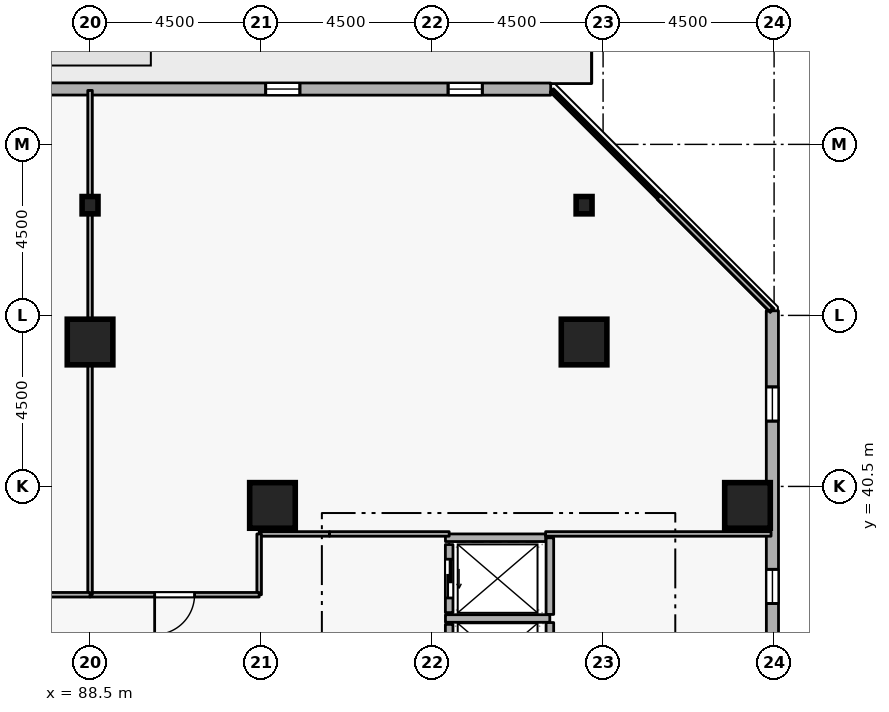
"""IFC4 building model, lengths in metres.
Left out: names, types, materials, properties, quantities, classifications, styles, units other than length and angle.
Written with IfcOpenShell. Run it as: python <this file> out.ifc"""

import sys

from ifc_helpers import new_model, si_unit, direction, frame, frame_2d, origin, origin_2d, place, context, subcontext, project, spatial, rectangle, i_section, extrude, element, fill, save


model = new_model("IFC4")
c1 = context("Model", 3, precision=1e-05, world=origin(), true_north=direction((0.0, 1.0)))
c2 = subcontext(c1, "Body", "Model", "MODEL_VIEW")
j1 = project(units=[si_unit("LENGTHUNIT", "METRE"), si_unit("PLANEANGLEUNIT", "RADIAN")], contexts=[c1])
p1 = place(None, origin())
s1 = spatial("IfcSite", under=j1, at=p1, CompositionType="ELEMENT")
p2 = place(p1, origin())
s2 = spatial("IfcBuilding", under=s1, at=p2, CompositionType="ELEMENT")
p3 = place(p2, frame((0.0, 0.0, 80.1)))
s3 = spatial("IfcBuildingStorey", under=s2, at=p3, CompositionType="ELEMENT", Elevation=80.1)
for number, where, z_axis, x_axis in (
    (1, (105.8, 40.0, 0.0), (0.0, 0.0, 1.0), (1.0, 0.0, 0.0)),
    (2, (101.5, 44.3, 0.0), (0.0, 0.0, 1.0), (1.0, 0.0, 0.0)),
    (3, (88.5, 44.3, 0.0), (0.0, 0.0, 1.0), (1.0, 0.0, 0.0)),
    (4, (93.3, 40.0, 0.0), (0.0, 0.0, 1.0), (1.0, 0.0, 0.0)),
):
    element("IfcColumn", number, at=place(p3, frame(where, z_axis=z_axis, x_axis=x_axis)), inside=s3, PredefinedType="COLUMN", context=c2, shape_type="SweptSolid", body=[
        extrude(rectangle(XDim=1.2, YDim=1.2, at=origin_2d()), origin(), (0.0, 0.0, 1.0), 3.6),
    ])
for number, where, z_axis, x_axis in (
    (5, (101.5, 47.9, 0.0), (0.0, 0.0, 1.0), (1.0, 0.0, 0.0)),
    (6, (88.5, 47.9, 0.0), (0.0, 0.0, 1.0), (1.0, 0.0, 0.0)),
):
    element("IfcColumn", number, at=place(p3, frame(where, z_axis=z_axis, x_axis=x_axis)), inside=s3, PredefinedType="COLUMN", context=c2, shape_type="SweptSolid", body=[
        extrude(i_section(OverallWidth=0.418, OverallDepth=0.456, WebThickness=0.042, FlangeThickness=0.067, FilletRadius=0.015, at=origin_2d()), origin(), (0.0, 0.0, 1.0), 3.6),
    ])
p4 = place(p3, frame((106.465, 11.619, 0.0), z_axis=(0.0, 0.0, 1.0), x_axis=(-0.000313347115, 0.999999950907, 0.0)))
e7 = element("IfcWall", 7, at=p4, inside=s3, PredefinedType="STANDARD", context=c2, shape_type="SweptSolid", body=[
    extrude(rectangle(XDim=33.503, YDim=0.32, at=frame_2d((16.751, 0.0))), origin(), (0.0, 0.0, 1.0), 2.7),
])
p5 = place(p4, frame((6.6, 0.0, 0.72)))
e8 = element("IfcOpeningElement", 8, at=p5, cuts=e7, PredefinedType="OPENING", context=c2, shape_type="SweptSolid", body=[
    extrude(rectangle(XDim=0.9, YDim=1.75, at=frame_2d((0.45, 0.875))), frame((0.0, 0.17, 0.0), z_axis=(0.0, -1.0, 0.0), x_axis=(1.0, 0.0, 0.0)), (0.0, 0.0, 1.0), 0.34),
])
p6 = place(p4, frame((11.4, 0.0, 0.72)))
e9 = element("IfcOpeningElement", 9, at=p6, cuts=e7, PredefinedType="OPENING", context=c2, shape_type="SweptSolid", body=[
    extrude(rectangle(XDim=0.9, YDim=1.75, at=frame_2d((0.45, 0.875))), frame((0.0, 0.17, 0.0), z_axis=(0.0, -1.0, 0.0), x_axis=(1.0, 0.0, 0.0)), (0.0, 0.0, 1.0), 0.34),
])
p7 = place(p4, frame((21.0, 0.0, 0.72)))
e10 = element("IfcOpeningElement", 10, at=p7, cuts=e7, PredefinedType="OPENING", context=c2, shape_type="SweptSolid", body=[
    extrude(rectangle(XDim=0.9, YDim=1.75, at=frame_2d((0.45, 0.875))), frame((0.0, 0.17, 0.0), z_axis=(0.0, -1.0, 0.0), x_axis=(1.0, 0.0, 0.0)), (0.0, 0.0, 1.0), 0.34),
])
p8 = place(p4, frame((25.8, 0.0, 0.72)))
e11 = element("IfcOpeningElement", 11, at=p8, cuts=e7, PredefinedType="OPENING", context=c2, shape_type="SweptSolid", body=[
    extrude(rectangle(XDim=0.9, YDim=1.75, at=frame_2d((0.45, 0.875))), frame((0.0, 0.17, 0.0), z_axis=(0.0, -1.0, 0.0), x_axis=(1.0, 0.0, 0.0)), (0.0, 0.0, 1.0), 0.34),
])
p9 = place(p4, frame((30.6, 0.0, 0.72)))
e12 = element("IfcOpeningElement", 12, at=p9, cuts=e7, PredefinedType="OPENING", context=c2, shape_type="SweptSolid", body=[
    extrude(rectangle(XDim=0.9, YDim=1.75, at=frame_2d((0.45, 0.875))), frame((0.0, 0.17, 0.0), z_axis=(0.0, -1.0, 0.0), x_axis=(1.0, 0.0, 0.0)), (0.0, 0.0, 1.0), 0.34),
])
p10 = place(p3, frame((100.622, 50.954, 0.0), z_axis=(0.0, 0.0, 1.0), x_axis=(-0.999999950907, 0.000313347115, 0.0)))
e13 = element("IfcWall", 13, at=p10, inside=s3, PredefinedType="STANDARD", context=c2, shape_type="SweptSolid", body=[
    extrude(rectangle(XDim=33.503, YDim=0.32, at=frame_2d((16.751, 0.0))), origin(), (0.0, 0.0, 1.0), 2.7),
])
p11 = place(p10, frame((18.552, 0.0, 0.0)))
e14 = element("IfcOpeningElement", 14, at=p11, cuts=e13, PredefinedType="OPENING", context=c2, shape_type="SweptSolid", body=[
    extrude(rectangle(XDim=1.0, YDim=2.08, at=frame_2d((0.5, 1.04))), frame((0.0, 0.17, 0.0), z_axis=(0.0, -1.0, 0.0), x_axis=(1.0, 0.0, 0.0)), (0.0, 0.0, 1.0), 0.34),
])
p12 = place(p10, frame((1.8, 0.0, 0.72)))
e15 = element("IfcOpeningElement", 15, at=p12, cuts=e13, PredefinedType="OPENING", context=c2, shape_type="SweptSolid", body=[
    extrude(rectangle(XDim=0.9, YDim=1.75, at=frame_2d((0.45, 0.875))), frame((0.0, 0.17, 0.0), z_axis=(0.0, -1.0, 0.0), x_axis=(1.0, 0.0, 0.0)), (0.0, 0.0, 1.0), 0.34),
])
p13 = place(p10, frame((6.6, 0.0, 0.72)))
e16 = element("IfcOpeningElement", 16, at=p13, cuts=e13, PredefinedType="OPENING", context=c2, shape_type="SweptSolid", body=[
    extrude(rectangle(XDim=0.9, YDim=1.75, at=frame_2d((0.45, 0.875))), frame((0.0, 0.17, 0.0), z_axis=(0.0, -1.0, 0.0), x_axis=(1.0, 0.0, 0.0)), (0.0, 0.0, 1.0), 0.34),
])
p14 = place(p10, frame((16.2, 0.0, 0.72)))
e17 = element("IfcOpeningElement", 17, at=p14, cuts=e13, PredefinedType="OPENING", context=c2, shape_type="SweptSolid", body=[
    extrude(rectangle(XDim=0.9, YDim=1.75, at=frame_2d((0.45, 0.875))), frame((0.0, 0.17, 0.0), z_axis=(0.0, -1.0, 0.0), x_axis=(1.0, 0.0, 0.0)), (0.0, 0.0, 1.0), 0.34),
])
p15 = place(p10, frame((21.0, 0.0, 0.72)))
e18 = element("IfcOpeningElement", 18, at=p15, cuts=e13, PredefinedType="OPENING", context=c2, shape_type="SweptSolid", body=[
    extrude(rectangle(XDim=0.9, YDim=1.75, at=frame_2d((0.45, 0.875))), frame((0.0, 0.17, 0.0), z_axis=(0.0, -1.0, 0.0), x_axis=(1.0, 0.0, 0.0)), (0.0, 0.0, 1.0), 0.34),
])
p16 = place(p10, frame((25.8, 0.0, 0.72)))
e19 = element("IfcOpeningElement", 19, at=p16, cuts=e13, PredefinedType="OPENING", context=c2, shape_type="SweptSolid", body=[
    extrude(rectangle(XDim=0.9, YDim=1.75, at=frame_2d((0.45, 0.875))), frame((0.0, 0.17, 0.0), z_axis=(0.0, -1.0, 0.0), x_axis=(1.0, 0.0, 0.0)), (0.0, 0.0, 1.0), 0.34),
])
p17 = place(p10, frame((30.6, 0.0, 0.72)))
e20 = element("IfcOpeningElement", 20, at=p17, cuts=e13, PredefinedType="OPENING", context=c2, shape_type="SweptSolid", body=[
    extrude(rectangle(XDim=0.9, YDim=1.75, at=frame_2d((0.45, 0.875))), frame((0.0, 0.17, 0.0), z_axis=(0.0, -1.0, 0.0), x_axis=(1.0, 0.0, 0.0)), (0.0, 0.0, 1.0), 0.34),
])
p18 = place(p3, frame((97.95, 36.87, 0.0), z_axis=(0.0, 0.0, 1.0), x_axis=(0.0, -1.0, 0.0)))
e21 = element("IfcWall", 21, at=p18, inside=s3, PredefinedType="STANDARD", context=c2, shape_type="SweptSolid", body=[
    extrude(rectangle(XDim=1.74, YDim=0.2, at=frame_2d((0.87, 0.0))), origin(), (0.0, 0.0, 1.0), 3.34),
])
p19 = place(p18, frame((0.36, 0.0, 0.0)))
e22 = element("IfcOpeningElement", 22, at=p19, cuts=e21, PredefinedType="OPENING", context=c2, shape_type="SweptSolid", body=[
    extrude(rectangle(XDim=1.02, YDim=2.06, at=frame_2d((0.51, 1.03))), frame((0.0, 0.11, 0.0), z_axis=(0.0, -1.0, 0.0), x_axis=(1.0, 0.0, 0.0)), (0.0, 0.0, 1.0), 0.22),
])
p20 = place(p3, frame((97.95, 38.97, 0.0), z_axis=(0.0, 0.0, 1.0), x_axis=(0.0, -1.0, 0.0)))
e23 = element("IfcWall", 23, at=p20, inside=s3, PredefinedType="STANDARD", context=c2, shape_type="SweptSolid", body=[
    extrude(rectangle(XDim=1.79, YDim=0.2, at=frame_2d((0.895, 0.0))), origin(), (0.0, 0.0, 1.0), 3.34),
])
p21 = place(p20, frame((0.385, 0.0, 0.0)))
e24 = element("IfcOpeningElement", 24, at=p21, cuts=e23, PredefinedType="OPENING", context=c2, shape_type="SweptSolid", body=[
    extrude(rectangle(XDim=1.02, YDim=2.06, at=frame_2d((0.51, 1.03))), frame((0.0, 0.11, 0.0), z_axis=(0.0, -1.0, 0.0), x_axis=(1.0, 0.0, 0.0)), (0.0, 0.0, 1.0), 0.22),
])
p22 = place(p3, frame((97.852, 37.025, 0.0), z_axis=(0.0, 0.0, 1.0), x_axis=(1.0, 0.0, 0.0)))
e25 = element("IfcWall", 25, at=p22, inside=s3, PredefinedType="STANDARD", context=c2, shape_type="SweptSolid", body=[
    extrude(rectangle(XDim=2.746, YDim=0.2, at=frame_2d((1.373, 0.0))), origin(), (0.0, 0.0, 1.0), 3.34),
])
p23 = place(p3, frame((100.6, 35.062, 0.0), z_axis=(0.0, 0.0, 1.0), x_axis=(0.0, 1.0, 0.0)))
e26 = element("IfcWall", 26, at=p23, inside=s3, PredefinedType="STANDARD", context=c2, shape_type="SweptSolid", body=[
    extrude(rectangle(XDim=1.856, YDim=0.2, at=frame_2d((0.928, 0.0))), origin(), (0.0, 0.0, 1.0), 3.34),
])
p24 = place(p3, frame((100.6, 37.132, 0.0), z_axis=(0.0, 0.0, 1.0), x_axis=(0.0, 1.0, 0.0)))
e27 = element("IfcWall", 27, at=p24, inside=s3, PredefinedType="STANDARD", context=c2, shape_type="SweptSolid", body=[
    extrude(rectangle(XDim=2.016, YDim=0.2, at=frame_2d((1.008, 0.0))), origin(), (0.0, 0.0, 1.0), 3.34),
])
p25 = place(p3, frame((97.852, 39.15, 0.0), z_axis=(0.0, 0.0, 1.0), x_axis=(1.0, 0.0, 0.0)))
e28 = element("IfcWall", 28, at=p25, inside=s3, PredefinedType="STANDARD", context=c2, shape_type="SweptSolid", body=[
    extrude(rectangle(XDim=2.636, YDim=0.2, at=frame_2d((1.318, 0.0))), origin(), (0.0, 0.0, 1.0), 3.34),
])
p26 = place(p3, frame((106.42, 39.25, 0.0), z_axis=(0.0, 0.0, 1.0), x_axis=(-1.0, 0.0, 0.0)))
e29 = element("IfcWall", 29, at=p26, inside=s3, PredefinedType="PARTITIONING", context=c2, shape_type="SweptSolid", body=[
    extrude(rectangle(XDim=5.932, YDim=0.12, at=frame_2d((2.966, 0.0))), origin(), (0.0, 0.0, 1.0), 3.34),
])
p27 = place(p3, frame((97.95, 39.25, 0.0), z_axis=(0.0, 0.0, 1.0), x_axis=(-1.0, 0.0, 0.0)))
e30 = element("IfcWall", 30, at=p27, inside=s3, PredefinedType="PARTITIONING", context=c2, shape_type="SweptSolid", body=[
    extrude(rectangle(XDim=3.15, YDim=0.12, at=frame_2d((1.575, 0.0))), origin(), (0.0, 0.0, 1.0), 3.34),
])
p28 = place(p3, frame((94.8, 39.25, 0.0), z_axis=(0.0, 0.0, 1.0), x_axis=(-1.0, 0.0, 0.0)))
e31 = element("IfcWall", 31, at=p28, inside=s3, PredefinedType="PARTITIONING", context=c2, shape_type="SweptSolid", body=[
    extrude(rectangle(XDim=1.85, YDim=0.12, at=frame_2d((0.925, 0.0))), origin(), (0.0, 0.0, 1.0), 3.34),
])
p29 = place(p3, frame((92.95, 39.25, 0.0), z_axis=(0.0, 0.0, 1.0), x_axis=(0.0, -1.0, 0.0)))
e32 = element("IfcWall", 32, at=p29, inside=s3, PredefinedType="PARTITIONING", context=c2, shape_type="SweptSolid", body=[
    extrude(rectangle(XDim=1.6, YDim=0.12, at=frame_2d((0.8, 0.0))), origin(), (0.0, 0.0, 1.0), 3.34),
])
p30 = place(p3, frame((92.95, 37.65, 0.0), z_axis=(0.0, 0.0, 1.0), x_axis=(-1.0, 0.0, 0.0)))
e33 = element("IfcWall", 33, at=p30, inside=s3, PredefinedType="PARTITIONING", context=c2, shape_type="SweptSolid", body=[
    extrude(rectangle(XDim=4.45, YDim=0.12, at=frame_2d((2.225, 0.0))), origin(), (0.0, 0.0, 1.0), 3.34),
])
p31 = place(p30, frame((1.7, 0.0, 0.0)))
e34 = element("IfcOpeningElement", 34, at=p31, cuts=e33, PredefinedType="OPENING", context=c2, shape_type="SweptSolid", body=[
    extrude(rectangle(XDim=1.05, YDim=2.1, at=frame_2d((0.525, 1.05))), frame((0.0, 0.07, 0.0), z_axis=(0.0, -1.0, 0.0), x_axis=(1.0, 0.0, 0.0)), (0.0, 0.0, 1.0), 0.14),
])
p32 = place(p3, frame((88.5, 37.65, 0.0), z_axis=(0.0, 0.0, 1.0), x_axis=(0.0, 1.0, 0.0)))
e35 = element("IfcWall", 35, at=p32, inside=s3, PredefinedType="PARTITIONING", context=c2, shape_type="SweptSolid", body=[
    extrude(rectangle(XDim=13.27, YDim=0.12, at=frame_2d((6.635, 0.0))), origin(), (0.0, 0.0, 1.0), 2.882),
])
p33 = place(p3, frame((100.652, 50.92, 0.0), z_axis=(0.0, 0.0, 1.0), x_axis=(0.707106781187, -0.707106781187, 0.0)))
e36 = element("IfcWall", 36, at=p33, inside=s3, PredefinedType="PARTITIONING", context=c2, shape_type="SweptSolid", body=[
    extrude(rectangle(XDim=8.156, YDim=0.12, at=frame_2d((4.078, 0.0))), origin(), (0.0, 0.0, 1.0), 3.34),
])
p34 = place(p3, frame((88.5, 37.65, 0.0), z_axis=(0.0, 0.0, 1.0), x_axis=(-1.0, 0.0, 0.0)))
e37 = element("IfcWall", 37, at=p34, inside=s3, PredefinedType="PARTITIONING", context=c2, shape_type="SweptSolid", body=[
    extrude(rectangle(XDim=4.45, YDim=0.12, at=frame_2d((2.225, 0.0))), origin(), (0.0, 0.0, 1.0), 3.34),
])
p35 = place(p8, origin())
e38 = element("IfcWindow", 38, at=p35, inside=s3, PartitioningType="SINGLE_PANEL", PredefinedType="WINDOW", context=c2, shape_type="SweptSolid", body=[
    extrude(rectangle(XDim=0.9, YDim=1.75, at=frame_2d((0.45, 0.875))), frame((0.0, 0.03, 0.0), z_axis=(0.0, -1.0, 0.0), x_axis=(1.0, 0.0, 0.0)), (0.0, 0.0, 1.0), 0.06),
])
fill(e11, e38)
p36 = place(p9, origin())
e39 = element("IfcWindow", 39, at=p36, inside=s3, PartitioningType="SINGLE_PANEL", PredefinedType="WINDOW", context=c2, shape_type="SweptSolid", body=[
    extrude(rectangle(XDim=0.9, YDim=1.75, at=frame_2d((0.45, 0.875))), frame((0.0, 0.03, 0.0), z_axis=(0.0, -1.0, 0.0), x_axis=(1.0, 0.0, 0.0)), (0.0, 0.0, 1.0), 0.06),
])
fill(e12, e39)
p37 = place(p12, origin())
e40 = element("IfcWindow", 40, at=p37, inside=s3, PartitioningType="SINGLE_PANEL", PredefinedType="WINDOW", context=c2, shape_type="SweptSolid", body=[
    extrude(rectangle(XDim=0.9, YDim=1.75, at=frame_2d((0.45, 0.875))), frame((0.0, 0.03, 0.0), z_axis=(0.0, -1.0, 0.0), x_axis=(1.0, 0.0, 0.0)), (0.0, 0.0, 1.0), 0.06),
])
fill(e15, e40)
p38 = place(p13, origin())
e41 = element("IfcWindow", 41, at=p38, inside=s3, PartitioningType="SINGLE_PANEL", PredefinedType="WINDOW", context=c2, shape_type="SweptSolid", body=[
    extrude(rectangle(XDim=0.9, YDim=1.75, at=frame_2d((0.45, 0.875))), frame((0.0, 0.03, 0.0), z_axis=(0.0, -1.0, 0.0), x_axis=(1.0, 0.0, 0.0)), (0.0, 0.0, 1.0), 0.06),
])
fill(e16, e41)
p39 = place(p21, origin())
e42 = element("IfcDoor", 42, at=p39, inside=s3, OperationType="SLIDING_TO_LEFT", PredefinedType="DOOR", context=c2, shape_type="SweptSolid", body=[
    extrude(rectangle(XDim=1.02, YDim=2.06, at=frame_2d((0.51, 1.03))), frame((0.0, 0.025, 0.0), z_axis=(0.0, -1.0, 0.0), x_axis=(1.0, 0.0, 0.0)), (0.0, 0.0, 1.0), 0.05),
])
fill(e24, e42)
p40 = place(p31, origin())
e43 = element("IfcDoor", 43, at=p40, inside=s3, OperationType="SINGLE_SWING_RIGHT", PredefinedType="DOOR", context=c2, shape_type="SweptSolid", body=[
    extrude(rectangle(XDim=1.05, YDim=2.1, at=frame_2d((0.525, 1.05))), frame((0.0, 0.025, 0.0), z_axis=(0.0, -1.0, 0.0), x_axis=(1.0, 0.0, 0.0)), (0.0, 0.0, 1.0), 0.05),
])
fill(e34, e43)
save(model, sys.argv[1])
